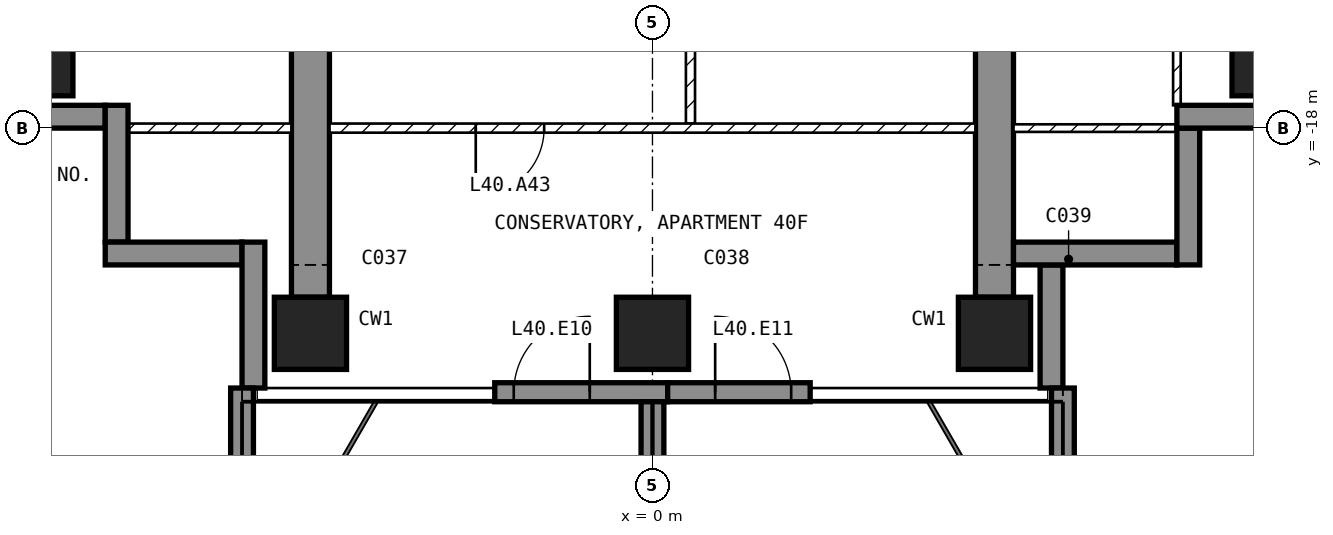
"""IFC4 building model, lengths in metres.
Left out: names, types, materials, properties, quantities, classifications, styles, units other than length and angle.
Written with IfcOpenShell. Run it as: python <this file> out.ifc"""

import sys

from ifc_helpers import new_model, si_unit, direction, frame, frame_2d, origin, origin_2d, place, context, subcontext, project, spatial, polyline, rectangle, outline, extrude, element, fill, save


model = new_model("IFC4")
c1 = context("Model", 3, precision=1e-05, world=origin(), true_north=direction((0.0, 1.0)))
c2 = subcontext(c1, "Body", "Model", "MODEL_VIEW")
j1 = project(units=[si_unit("LENGTHUNIT", "METRE"), si_unit("PLANEANGLEUNIT", "RADIAN")], contexts=[c1])
p1 = place(None, origin())
s1 = spatial("IfcSite", under=j1, at=p1, CompositionType="ELEMENT")
p2 = place(p1, origin())
s2 = spatial("IfcBuilding", under=s1, at=p2, CompositionType="ELEMENT")
p3 = place(p2, frame((0.0, 0.0, 166.6)))
s3 = spatial("IfcBuildingStorey", under=s2, at=p3, CompositionType="ELEMENT", Elevation=166.6)
for number, where, z_axis, x_axis in (
    (1, (-8.1, -17.1, -0.25), (0.0, 0.0, 1.0), (1.0, 0.0, 0.0)),
    (2, (-4.5, -20.7, -0.25), (0.0, 0.0, 1.0), (1.0, 0.0, 0.0)),
    (3, (0.0, -20.7, -0.25), (0.0, 0.0, 1.0), (1.0, 0.0, 0.0)),
    (4, (4.5, -20.7, -0.25), (0.0, 0.0, 1.0), (1.0, 0.0, 0.0)),
    (5, (8.1, -17.1, -0.25), (0.0, 0.0, 1.0), (1.0, 0.0, 0.0)),
):
    element("IfcColumn", number, at=place(p3, frame(where, z_axis=z_axis, x_axis=x_axis)), inside=s3, PredefinedType="COLUMN", context=c2, shape_type="SweptSolid", body=[
        extrude(rectangle(XDim=0.95, YDim=0.95, at=origin_2d()), origin(), (0.0, 0.0, 1.0), 3.5),
    ])
for number, where, z_axis, x_axis in (
    (6, (-4.75, -20.225, -0.25), (1.0, 0.0, 0.0), (0.0, 1.0, 0.0)),
    (7, (4.25, -20.225, -0.25), (1.0, 0.0, 0.0), (0.0, 1.0, 0.0)),
):
    element("IfcWall", number, at=place(p3, frame(where, z_axis=z_axis, x_axis=x_axis)), inside=s3, PredefinedType="SHEAR", context=c2, shape_type="SweptSolid", body=[
        extrude(outline(polyline([(0.0, 0.0), (6.725, 0.0), (6.725, 2.65), (9.125, 2.65), (9.125, 0.0), (11.225, 0.0), (11.225, 3.5), (0.0, 3.5), (0.0, 0.0)])), origin(), (0.0, 0.0, 1.0), 0.5),
    ])
p4 = place(p3, frame((-2.075, -21.475, 0.0), z_axis=(0.0, 0.0, 1.0), x_axis=(1.0, 0.0, 0.0)))
e8 = element("IfcWall", 8, at=p4, inside=s3, PredefinedType="SOLIDWALL", context=c2, shape_type="SweptSolid", body=[
    extrude(rectangle(XDim=2.275, YDim=0.25, at=frame_2d((1.137, 0.0))), origin(), (0.0, 0.0, 1.0), 3.25),
])
p5 = place(p4, frame((0.25, 0.0, 0.0)))
e9 = element("IfcOpeningElement", 9, at=p5, cuts=e8, PredefinedType="OPENING", context=c2, shape_type="SweptSolid", body=[
    extrude(rectangle(XDim=1.0, YDim=2.4, at=frame_2d((0.5, 1.2))), frame((0.0, 0.135, 0.0), z_axis=(0.0, -1.0, 0.0), x_axis=(1.0, 0.0, 0.0)), (0.0, 0.0, 1.0), 0.27),
])
p6 = place(p3, frame((0.2, -21.475, 0.0), z_axis=(0.0, 0.0, 1.0), x_axis=(1.0, 0.0, 0.0)))
e10 = element("IfcWall", 10, at=p6, inside=s3, PredefinedType="SOLIDWALL", context=c2, shape_type="SweptSolid", body=[
    extrude(rectangle(XDim=1.875, YDim=0.25, at=frame_2d((0.938, 0.0))), origin(), (0.0, 0.0, 1.0), 3.25),
])
p7 = place(p6, frame((0.625, 0.0, 0.0)))
e11 = element("IfcOpeningElement", 11, at=p7, cuts=e10, PredefinedType="OPENING", context=c2, shape_type="SweptSolid", body=[
    extrude(rectangle(XDim=1.0, YDim=2.4, at=frame_2d((0.5, 1.2))), frame((0.0, 0.135, 0.0), z_axis=(0.0, -1.0, 0.0), x_axis=(1.0, 0.0, 0.0)), (0.0, 0.0, 1.0), 0.27),
])
p8 = place(p3, frame((5.25, -21.42, 0.0), z_axis=(0.0, 0.0, 1.0), x_axis=(0.0, 1.0, 0.0)))
e12 = element("IfcWall", 12, at=p8, inside=s3, PredefinedType="SOLIDWALL", context=c2, shape_type="SweptSolid", body=[
    extrude(rectangle(XDim=1.62, YDim=0.3, at=frame_2d((0.81, 0.0))), origin(), (0.0, 0.0, 1.0), 3.25),
])
p9 = place(p3, frame((4.75, -19.65, 0.0), z_axis=(0.0, 0.0, 1.0), x_axis=(1.0, 0.0, 0.0)))
e13 = element("IfcWall", 13, at=p9, inside=s3, PredefinedType="SOLIDWALL", context=c2, shape_type="SweptSolid", body=[
    extrude(rectangle(XDim=2.15, YDim=0.3, at=frame_2d((1.075, 0.0))), origin(), (0.0, 0.0, 1.0), 3.25),
])
p10 = place(p3, frame((7.05, -19.8, 0.0), z_axis=(0.0, 0.0, 1.0), x_axis=(0.0, 1.0, 0.0)))
e14 = element("IfcWall", 14, at=p10, inside=s3, PredefinedType="SOLIDWALL", context=c2, shape_type="SweptSolid", body=[
    extrude(rectangle(XDim=1.8, YDim=0.3, at=frame_2d((0.9, 0.0))), origin(), (0.0, 0.0, 1.0), 3.25),
])
p11 = place(p3, frame((6.9, -17.85, 0.0), z_axis=(0.0, 0.0, 1.0), x_axis=(1.0, 0.0, 0.0)))
e15 = element("IfcWall", 15, at=p11, inside=s3, PredefinedType="SOLIDWALL", context=c2, shape_type="SweptSolid", body=[
    extrude(rectangle(XDim=1.85, YDim=0.3, at=frame_2d((0.925, 0.0))), origin(), (0.0, 0.0, 1.0), 3.25),
])
p12 = place(p3, frame((-8.75, -17.85, 0.0), z_axis=(0.0, 0.0, 1.0), x_axis=(1.0, 0.0, 0.0)))
e16 = element("IfcWall", 16, at=p12, inside=s3, PredefinedType="SOLIDWALL", context=c2, shape_type="SweptSolid", body=[
    extrude(rectangle(XDim=1.55, YDim=0.3, at=frame_2d((0.775, 0.0))), origin(), (0.0, 0.0, 1.0), 3.25),
])
for number, where, z_axis, x_axis in (
    (17, (-7.05, -17.7, 0.0), (0.0, 0.0, 1.0), (0.0, -1.0, 0.0)),
    (18, (-7.2, -19.65, 0.0), (0.0, 0.0, 1.0), (1.0, 0.0, 0.0)),
):
    element("IfcWall", number, at=place(p3, frame(where, z_axis=z_axis, x_axis=x_axis)), inside=s3, PredefinedType="SOLIDWALL", context=c2, shape_type="SweptSolid", body=[
        extrude(rectangle(XDim=1.8, YDim=0.3, at=frame_2d((0.9, 0.0))), origin(), (0.0, 0.0, 1.0), 3.25),
    ])
p13 = place(p3, frame((-5.25, -19.5, 0.0), z_axis=(0.0, 0.0, 1.0), x_axis=(0.0, -1.0, 0.0)))
e19 = element("IfcWall", 19, at=p13, inside=s3, PredefinedType="SOLIDWALL", context=c2, shape_type="SweptSolid", body=[
    extrude(rectangle(XDim=1.92, YDim=0.3, at=frame_2d((0.96, 0.0))), origin(), (0.0, 0.0, 1.0), 3.25),
])
p14 = place(p3, frame((-5.4, -21.42, 0.0), z_axis=(0.0, 0.0, 1.0), x_axis=(0.0, -1.0, 0.0)))
e20 = element("IfcWall", 20, at=p14, inside=s3, PredefinedType="SOLIDWALL", context=c2, shape_type="SweptSolid", body=[
    extrude(rectangle(XDim=2.88, YDim=0.3, at=frame_2d((1.44, 0.0))), origin(), (0.0, 0.0, 1.0), 3.25),
])
p15 = place(p3, frame((0.0, -21.6, 0.0), z_axis=(0.0, 0.0, 1.0), x_axis=(0.0, -1.0, 0.0)))
e21 = element("IfcWall", 21, at=p15, inside=s3, PredefinedType="SOLIDWALL", context=c2, shape_type="SweptSolid", body=[
    extrude(rectangle(XDim=2.7, YDim=0.3, at=frame_2d((1.35, 0.0))), origin(), (0.0, 0.0, 1.0), 3.25),
])
p16 = place(p3, frame((5.4, -21.42, 0.0), z_axis=(0.0, 0.0, 1.0), x_axis=(0.0, -1.0, 0.0)))
e22 = element("IfcWall", 22, at=p16, inside=s3, PredefinedType="SOLIDWALL", context=c2, shape_type="SweptSolid", body=[
    extrude(rectangle(XDim=2.88, YDim=0.3, at=frame_2d((1.44, 0.0))), origin(), (0.0, 0.0, 1.0), 3.25),
])
p17 = place(p3, frame((0.5, -15.06, 0.0), z_axis=(0.0, 0.0, 1.0), x_axis=(0.0, -1.0, 0.0)))
e23 = element("IfcWall", 23, at=p17, inside=s3, PredefinedType="PARTITIONING", context=c2, shape_type="SweptSolid", body=[
    extrude(rectangle(XDim=2.88, YDim=0.12, at=frame_2d((1.44, 0.0))), origin(), (0.0, 0.0, 1.0), 3.25),
])
p18 = place(p3, frame((4.25, -18.0, 0.0), z_axis=(0.0, 0.0, 1.0), x_axis=(-1.0, 0.0, 0.0)))
e24 = element("IfcWall", 24, at=p18, inside=s3, PredefinedType="PARTITIONING", context=c2, shape_type="SweptSolid", body=[
    extrude(rectangle(XDim=8.5, YDim=0.12, at=frame_2d((4.25, 0.0))), origin(), (0.0, 0.0, 1.0), 3.25),
])
p19 = place(p18, frame((5.675, 0.0, 0.0)))
e25 = element("IfcOpeningElement", 25, at=p19, cuts=e24, PredefinedType="OPENING", context=c2, shape_type="SweptSolid", body=[
    extrude(rectangle(XDim=0.9, YDim=2.1, at=frame_2d((0.45, 1.05))), frame((0.0, 0.07, 0.0), z_axis=(0.0, -1.0, 0.0), x_axis=(1.0, 0.0, 0.0)), (0.0, 0.0, 1.0), 0.14),
])
p20 = place(p3, frame((6.9, -17.7, 0.0), z_axis=(0.0, 0.0, 1.0), x_axis=(0.0, 1.0, 0.0)))
e26 = element("IfcWall", 26, at=p20, inside=s3, PredefinedType="PARTITIONING", context=c2, shape_type="SweptSolid", body=[
    extrude(rectangle(XDim=3.25, YDim=0.1, at=frame_2d((1.625, 0.0))), origin(), (0.0, 0.0, 1.0), 3.25),
])
p21 = place(p20, frame((2.05, 0.0, 0.0)))
e27 = element("IfcOpeningElement", 27, at=p21, cuts=e26, PredefinedType="OPENING", context=c2, shape_type="SweptSolid", body=[
    extrude(rectangle(XDim=0.85, YDim=2.1, at=frame_2d((0.425, 1.05))), frame((0.0, 0.06, 0.0), z_axis=(0.0, -1.0, 0.0), x_axis=(1.0, 0.0, 0.0)), (0.0, 0.0, 1.0), 0.12),
])
p22 = place(p3, frame((7.12, -18.0, 0.0), z_axis=(0.0, 0.0, 1.0), x_axis=(-1.0, 0.0, 0.0)))
e28 = element("IfcWall", 28, at=p22, inside=s3, PredefinedType="PARTITIONING", context=c2, shape_type="SweptSolid", body=[
    extrude(rectangle(XDim=2.37, YDim=0.1, at=frame_2d((1.185, 0.0))), origin(), (0.0, 0.0, 1.0), 3.25),
])
p23 = place(p3, frame((-4.75, -18.0, 0.0), z_axis=(0.0, 0.0, 1.0), x_axis=(-1.0, 0.0, 0.0)))
e29 = element("IfcWall", 29, at=p23, inside=s3, PredefinedType="PARTITIONING", context=c2, shape_type="SweptSolid", body=[
    extrude(rectangle(XDim=2.37, YDim=0.12, at=frame_2d((1.185, 0.0))), origin(), (0.0, 0.0, 1.0), 3.25),
])
p24 = place(p5, origin())
e30 = element("IfcDoor", 30, at=p24, inside=s3, OperationType="SINGLE_SWING_RIGHT", PredefinedType="DOOR", context=c2, shape_type="SweptSolid", body=[
    extrude(rectangle(XDim=1.0, YDim=2.4, at=frame_2d((0.5, 1.2))), frame((0.0, 0.025, 0.0), z_axis=(0.0, -1.0, 0.0), x_axis=(1.0, 0.0, 0.0)), (0.0, 0.0, 1.0), 0.05),
])
fill(e9, e30)
p25 = place(p7, origin())
e31 = element("IfcDoor", 31, at=p25, inside=s3, OperationType="SINGLE_SWING_LEFT", PredefinedType="DOOR", context=c2, shape_type="SweptSolid", body=[
    extrude(rectangle(XDim=1.0, YDim=2.4, at=frame_2d((0.5, 1.2))), frame((0.0, 0.025, 0.0), z_axis=(0.0, -1.0, 0.0), x_axis=(1.0, 0.0, 0.0)), (0.0, 0.0, 1.0), 0.05),
])
fill(e11, e31)
p26 = place(p19, origin())
e32 = element("IfcDoor", 32, at=p26, inside=s3, OperationType="SINGLE_SWING_RIGHT", PredefinedType="DOOR", context=c2, shape_type="SweptSolid", body=[
    extrude(rectangle(XDim=0.9, YDim=2.1, at=frame_2d((0.45, 1.05))), frame((0.0, 0.025, 0.0), z_axis=(0.0, -1.0, 0.0), x_axis=(1.0, 0.0, 0.0)), (0.0, 0.0, 1.0), 0.05),
])
fill(e25, e32)
save(model, sys.argv[1])
